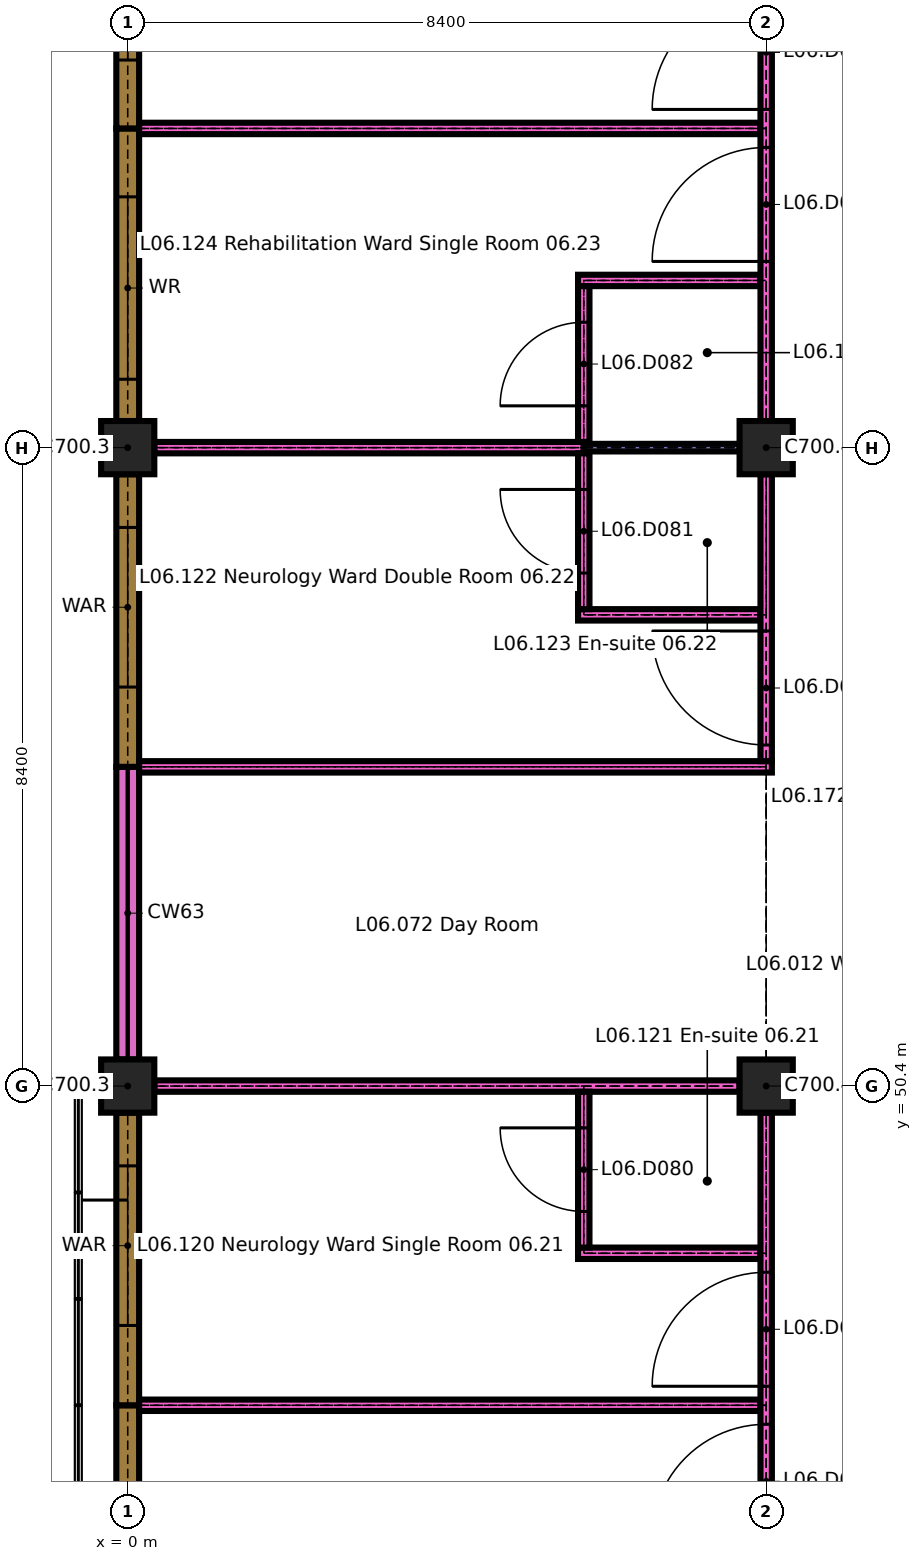
"""IFC4 building model, lengths in metres.
Left out: names, types, materials, properties, quantities, classifications, styles, units other than length and angle.
Written with IfcOpenShell. Run it as: python <this file> out.ifc"""

import sys

from ifc_helpers import new_model, si_unit, direction, frame, frame_2d, origin, origin_2d, place, context, subcontext, project, spatial, rectangle, extrude, element, fill, save


model = new_model("IFC4")
c1 = context("Model", 3, precision=1e-05, world=origin(), true_north=direction((0.0, 1.0)))
c2 = subcontext(c1, "Body", "Model", "MODEL_VIEW")
j1 = project(units=[si_unit("LENGTHUNIT", "METRE"), si_unit("PLANEANGLEUNIT", "RADIAN")], contexts=[c1])
p1 = place(None, origin())
s1 = spatial("IfcSite", under=j1, at=p1, CompositionType="ELEMENT")
p2 = place(p1, origin())
s2 = spatial("IfcBuilding", under=s1, at=p2, CompositionType="ELEMENT")
p3 = place(p2, frame((0.0, 0.0, 26.1)))
s3 = spatial("IfcBuildingStorey", under=s2, at=p3, CompositionType="ELEMENT", Elevation=26.1)
p4 = place(p3, frame((0.0, 50.4, 0.0), z_axis=(0.0, 0.0, 1.0), x_axis=(1.0, 0.0, 0.0)))
e1 = element("IfcColumn", 1, at=p4, inside=s3, PredefinedType="COLUMN", context=c2, shape_type="SweptSolid", body=[
    extrude(rectangle(XDim=0.7, YDim=0.7, at=origin_2d()), origin(), (0.0, 0.0, 1.0), 3.2),
])
p5 = place(p3, frame((8.4, 50.4, 0.0), z_axis=(0.0, 0.0, 1.0), x_axis=(1.0, 0.0, 0.0)))
e2 = element("IfcColumn", 2, at=p5, inside=s3, PredefinedType="COLUMN", context=c2, shape_type="SweptSolid", body=[
    extrude(rectangle(XDim=0.7, YDim=0.7, at=origin_2d()), origin(), (0.0, 0.0, 1.0), 3.3),
])
p6 = place(p3, frame((0.0, 58.8, 0.0), z_axis=(0.0, 0.0, 1.0), x_axis=(1.0, 0.0, 0.0)))
e3 = element("IfcColumn", 3, at=p6, inside=s3, PredefinedType="COLUMN", context=c2, shape_type="SweptSolid", body=[
    extrude(rectangle(XDim=0.7, YDim=0.7, at=origin_2d()), origin(), (0.0, 0.0, 1.0), 3.2),
])
p7 = place(p3, frame((8.4, 58.8, 0.0), z_axis=(0.0, 0.0, 1.0), x_axis=(1.0, 0.0, 0.0)))
e4 = element("IfcColumn", 4, at=p7, inside=s3, PredefinedType="COLUMN", context=c2, shape_type="SweptSolid", body=[
    extrude(rectangle(XDim=0.7, YDim=0.7, at=origin_2d()), origin(), (0.0, 0.0, 1.0), 3.3),
])
p8 = place(p3, frame((0.0, 42.35, 0.0), z_axis=(0.0, 0.0, 1.0), x_axis=(0.0, 1.0, 0.0)))
e5 = element("IfcWall", 5, at=p8, inside=s3, PredefinedType="SOLIDWALL", context=c2, shape_type="SweptSolid", body=[
    extrude(rectangle(XDim=3.85, YDim=0.3, at=frame_2d((1.925, 0.0))), origin(), (0.0, 0.0, 1.0), 2.9),
])
p9 = place(p8, frame((0.7, 0.0, 0.9)))
e6 = element("IfcOpeningElement", 6, at=p9, cuts=e5, PredefinedType="OPENING", context=c2, shape_type="SweptSolid", body=[
    extrude(rectangle(XDim=2.1, YDim=1.5, at=frame_2d((1.05, 0.75))), frame((0.0, 0.16, 0.0), z_axis=(0.0, -1.0, 0.0), x_axis=(1.0, 0.0, 0.0)), (0.0, 0.0, 1.0), 0.32),
])
p10 = place(p3, frame((0.0, 46.2, 0.0), z_axis=(0.0, 0.0, 1.0), x_axis=(0.0, 1.0, 0.0)))
e7 = element("IfcWall", 7, at=p10, inside=s3, PredefinedType="SOLIDWALL", context=c2, shape_type="SweptSolid", body=[
    extrude(rectangle(XDim=3.85, YDim=0.3, at=frame_2d((1.925, 0.0))), origin(), (0.0, 0.0, 1.0), 2.9),
])
p11 = place(p10, frame((1.05, 0.0, 0.9)))
e8 = element("IfcOpeningElement", 8, at=p11, cuts=e7, PredefinedType="OPENING", context=c2, shape_type="SweptSolid", body=[
    extrude(rectangle(XDim=2.1, YDim=1.5, at=frame_2d((1.05, 0.75))), frame((0.0, 0.16, 0.0), z_axis=(0.0, -1.0, 0.0), x_axis=(1.0, 0.0, 0.0)), (0.0, 0.0, 1.0), 0.32),
])
p12 = place(p3, frame((0.0, 50.75, 0.0), z_axis=(0.0, 0.0, 1.0), x_axis=(0.0, 1.0, 0.0)))
e9 = element("IfcWall", 9, at=p12, inside=s3, PredefinedType="SOLIDWALL", context=c2, shape_type="SweptSolid", body=[
    extrude(rectangle(XDim=3.85, YDim=0.3, at=frame_2d((1.925, 0.0))), origin(), (0.0, 0.0, 1.0), 0.6),
])
p13 = place(p3, frame((0.0, 54.6, 0.0), z_axis=(0.0, 0.0, 1.0), x_axis=(0.0, 1.0, 0.0)))
e10 = element("IfcWall", 10, at=p13, inside=s3, PredefinedType="SOLIDWALL", context=c2, shape_type="SweptSolid", body=[
    extrude(rectangle(XDim=3.85, YDim=0.3, at=frame_2d((1.925, 0.0))), origin(), (0.0, 0.0, 1.0), 2.9),
])
p14 = place(p13, frame((1.05, 0.0, 0.9)))
e11 = element("IfcOpeningElement", 11, at=p14, cuts=e10, PredefinedType="OPENING", context=c2, shape_type="SweptSolid", body=[
    extrude(rectangle(XDim=2.1, YDim=1.5, at=frame_2d((1.05, 0.75))), frame((0.0, 0.16, 0.0), z_axis=(0.0, -1.0, 0.0), x_axis=(1.0, 0.0, 0.0)), (0.0, 0.0, 1.0), 0.32),
])
p15 = place(p3, frame((0.0, 59.15, 0.0), z_axis=(0.0, 0.0, 1.0), x_axis=(0.0, 1.0, 0.0)))
e12 = element("IfcWall", 12, at=p15, inside=s3, PredefinedType="SOLIDWALL", context=c2, shape_type="SweptSolid", body=[
    extrude(rectangle(XDim=3.85, YDim=0.3, at=frame_2d((1.925, 0.0))), origin(), (0.0, 0.0, 1.0), 2.9),
])
p16 = place(p15, frame((0.55, 0.0, 0.6)))
e13 = element("IfcOpeningElement", 13, at=p16, cuts=e12, PredefinedType="OPENING", context=c2, shape_type="SweptSolid", body=[
    extrude(rectangle(XDim=2.4, YDim=1.8, at=frame_2d((1.2, 0.9))), frame((0.0, 0.16, 0.0), z_axis=(0.0, -1.0, 0.0), x_axis=(1.0, 0.0, 0.0)), (0.0, 0.0, 1.0), 0.32),
])
p17 = place(p3, frame((0.0, 63.0, 0.0), z_axis=(0.0, 0.0, 1.0), x_axis=(0.0, 1.0, 0.0)))
e14 = element("IfcWall", 14, at=p17, inside=s3, PredefinedType="SOLIDWALL", context=c2, shape_type="SweptSolid", body=[
    extrude(rectangle(XDim=4.2, YDim=0.3, at=frame_2d((2.1, 0.0))), origin(), (0.0, 0.0, 1.0), 2.9),
])
p18 = place(p17, frame((0.9, 0.0, 0.6)))
e15 = element("IfcOpeningElement", 15, at=p18, cuts=e14, PredefinedType="OPENING", context=c2, shape_type="SweptSolid", body=[
    extrude(rectangle(XDim=2.4, YDim=1.8, at=frame_2d((1.2, 0.9))), frame((0.0, 0.16, 0.0), z_axis=(0.0, -1.0, 0.0), x_axis=(1.0, 0.0, 0.0)), (0.0, 0.0, 1.0), 0.32),
])
p19 = place(p3, frame((0.15, 46.2, 0.0), z_axis=(0.0, 0.0, 1.0), x_axis=(1.0, 0.0, 0.0)))
e16 = element("IfcWall", 16, at=p19, inside=s3, PredefinedType="PARTITIONING", context=c2, shape_type="SweptSolid", body=[
    extrude(rectangle(XDim=8.175, YDim=0.15, at=frame_2d((4.087, 0.0))), origin(), (0.0, 0.0, 1.0), 3.3),
])
p20 = place(p3, frame((5.925, 48.2, 0.0), z_axis=(0.0, 0.0, 1.0), x_axis=(1.0, 0.0, 0.0)))
e17 = element("IfcWall", 17, at=p20, inside=s3, PredefinedType="PARTITIONING", context=c2, shape_type="SweptSolid", body=[
    extrude(rectangle(XDim=2.4, YDim=0.15, at=frame_2d((1.2, 0.0))), origin(), (0.0, 0.0, 1.0), 3.3),
])
p21 = place(p3, frame((0.35, 50.4, 0.0), z_axis=(0.0, 0.0, 1.0), x_axis=(1.0, 0.0, 0.0)))
e18 = element("IfcWall", 18, at=p21, inside=s3, PredefinedType="PARTITIONING", context=c2, shape_type="SweptSolid", body=[
    extrude(rectangle(XDim=7.7, YDim=0.15, at=frame_2d((3.85, 0.0))), origin(), (0.0, 0.0, 1.0), 3.3),
])
p22 = place(p3, frame((0.15, 54.6, 0.0), z_axis=(0.0, 0.0, 1.0), x_axis=(1.0, 0.0, 0.0)))
e19 = element("IfcWall", 19, at=p22, inside=s3, PredefinedType="PARTITIONING", context=c2, shape_type="SweptSolid", body=[
    extrude(rectangle(XDim=8.325, YDim=0.15, at=frame_2d((4.163, 0.0))), origin(), (0.0, 0.0, 1.0), 3.3),
])
p23 = place(p3, frame((5.925, 56.6, 0.0), z_axis=(0.0, 0.0, 1.0), x_axis=(1.0, 0.0, 0.0)))
e20 = element("IfcWall", 20, at=p23, inside=s3, PredefinedType="PARTITIONING", context=c2, shape_type="SweptSolid", body=[
    extrude(rectangle(XDim=2.4, YDim=0.15, at=frame_2d((1.2, 0.0))), origin(), (0.0, 0.0, 1.0), 3.3),
])
p24 = place(p3, frame((0.35, 58.8, 0.0), z_axis=(0.0, 0.0, 1.0), x_axis=(1.0, 0.0, 0.0)))
e21 = element("IfcWall", 21, at=p24, inside=s3, PredefinedType="PARTITIONING", context=c2, shape_type="SweptSolid", body=[
    extrude(rectangle(XDim=5.65, YDim=0.15, at=frame_2d((2.825, 0.0))), origin(), (0.0, 0.0, 1.0), 3.3),
])
p25 = place(p3, frame((6.0, 58.8, 0.0), z_axis=(0.0, 0.0, 1.0), x_axis=(1.0, 0.0, 0.0)))
e22 = element("IfcWall", 22, at=p25, inside=s3, PredefinedType="PARTITIONING", context=c2, shape_type="SweptSolid", body=[
    extrude(rectangle(XDim=2.05, YDim=0.1, at=frame_2d((1.025, 0.0))), origin(), (0.0, 0.0, 1.0), 3.3),
])
p26 = place(p3, frame((5.925, 61.0, 0.0), z_axis=(0.0, 0.0, 1.0), x_axis=(1.0, 0.0, 0.0)))
e23 = element("IfcWall", 23, at=p26, inside=s3, PredefinedType="PARTITIONING", context=c2, shape_type="SweptSolid", body=[
    extrude(rectangle(XDim=2.4, YDim=0.15, at=frame_2d((1.2, 0.0))), origin(), (0.0, 0.0, 1.0), 3.3),
])
p27 = place(p3, frame((0.15, 63.0, 0.0), z_axis=(0.0, 0.0, 1.0), x_axis=(1.0, 0.0, 0.0)))
e24 = element("IfcWall", 24, at=p27, inside=s3, PredefinedType="PARTITIONING", context=c2, shape_type="SweptSolid", body=[
    extrude(rectangle(XDim=8.175, YDim=0.15, at=frame_2d((4.087, 0.0))), origin(), (0.0, 0.0, 1.0), 3.3),
])
p28 = place(p3, frame((6.0, 48.275, 0.0), z_axis=(0.0, 0.0, 1.0), x_axis=(0.0, 1.0, 0.0)))
e25 = element("IfcWall", 25, at=p28, inside=s3, PredefinedType="PARTITIONING", context=c2, shape_type="SweptSolid", body=[
    extrude(rectangle(XDim=2.05, YDim=0.15, at=frame_2d((1.025, 0.0))), origin(), (0.0, 0.0, 1.0), 3.3),
])
p29 = place(p28, frame((0.475, 0.0, 0.0)))
e26 = element("IfcOpeningElement", 26, at=p29, cuts=e25, PredefinedType="OPENING", context=c2, shape_type="SweptSolid", body=[
    extrude(rectangle(XDim=1.1, YDim=2.1, at=frame_2d((0.55, 1.05))), frame((0.0, 0.085, 0.0), z_axis=(0.0, -1.0, 0.0), x_axis=(1.0, 0.0, 0.0)), (0.0, 0.0, 1.0), 0.17),
])
p30 = place(p3, frame((6.0, 56.675, 0.0), z_axis=(0.0, 0.0, 1.0), x_axis=(0.0, 1.0, 0.0)))
e27 = element("IfcWall", 27, at=p30, inside=s3, PredefinedType="PARTITIONING", context=c2, shape_type="SweptSolid", body=[
    extrude(rectangle(XDim=2.05, YDim=0.15, at=frame_2d((1.025, 0.0))), origin(), (0.0, 0.0, 1.0), 3.3),
])
p31 = place(p30, frame((0.475, 0.0, 0.0)))
e28 = element("IfcOpeningElement", 28, at=p31, cuts=e27, PredefinedType="OPENING", context=c2, shape_type="SweptSolid", body=[
    extrude(rectangle(XDim=1.1, YDim=2.1, at=frame_2d((0.55, 1.05))), frame((0.0, 0.085, 0.0), z_axis=(0.0, -1.0, 0.0), x_axis=(1.0, 0.0, 0.0)), (0.0, 0.0, 1.0), 0.17),
])
p32 = place(p3, frame((6.0, 58.875, 0.0), z_axis=(0.0, 0.0, 1.0), x_axis=(0.0, 1.0, 0.0)))
e29 = element("IfcWall", 29, at=p32, inside=s3, PredefinedType="PARTITIONING", context=c2, shape_type="SweptSolid", body=[
    extrude(rectangle(XDim=2.05, YDim=0.15, at=frame_2d((1.025, 0.0))), origin(), (0.0, 0.0, 1.0), 3.3),
])
p33 = place(p32, frame((0.475, 0.0, 0.0)))
e30 = element("IfcOpeningElement", 30, at=p33, cuts=e29, PredefinedType="OPENING", context=c2, shape_type="SweptSolid", body=[
    extrude(rectangle(XDim=1.1, YDim=2.1, at=frame_2d((0.55, 1.05))), frame((0.0, 0.085, 0.0), z_axis=(0.0, -1.0, 0.0), x_axis=(1.0, 0.0, 0.0)), (0.0, 0.0, 1.0), 0.17),
])
p34 = place(p3, frame((8.4, 42.35, 0.0), z_axis=(0.0, 0.0, 1.0), x_axis=(0.0, 1.0, 0.0)))
e31 = element("IfcWall", 31, at=p34, inside=s3, PredefinedType="PARTITIONING", context=c2, shape_type="SweptSolid", body=[
    extrude(rectangle(XDim=7.7, YDim=0.15, at=frame_2d((3.85, 0.0))), origin(), (0.0, 0.0, 1.0), 3.3),
])
p35 = place(p34, frame((2.1, 0.0, 0.0)))
e32 = element("IfcOpeningElement", 32, at=p35, cuts=e31, PredefinedType="OPENING", context=c2, shape_type="SweptSolid", body=[
    extrude(rectangle(XDim=1.5, YDim=2.4, at=frame_2d((0.75, 1.2))), frame((0.0, 0.085, 0.0), z_axis=(0.0, -1.0, 0.0), x_axis=(1.0, 0.0, 0.0)), (0.0, 0.0, 1.0), 0.17),
])
p36 = place(p34, frame((4.1, 0.0, 0.0)))
e33 = element("IfcOpeningElement", 33, at=p36, cuts=e31, PredefinedType="OPENING", context=c2, shape_type="SweptSolid", body=[
    extrude(rectangle(XDim=1.5, YDim=2.4, at=frame_2d((0.75, 1.2))), frame((0.0, 0.085, 0.0), z_axis=(0.0, -1.0, 0.0), x_axis=(1.0, 0.0, 0.0)), (0.0, 0.0, 1.0), 0.17),
])
p37 = place(p3, frame((8.4, 54.675, 0.0), z_axis=(0.0, 0.0, 1.0), x_axis=(0.0, 1.0, 0.0)))
e34 = element("IfcWall", 34, at=p37, inside=s3, PredefinedType="PARTITIONING", context=c2, shape_type="SweptSolid", body=[
    extrude(rectangle(XDim=3.775, YDim=0.15, at=frame_2d((1.887, 0.0))), origin(), (0.0, 0.0, 1.0), 3.3),
])
p38 = place(p37, frame((0.212, 0.0, 0.0)))
e35 = element("IfcOpeningElement", 35, at=p38, cuts=e34, PredefinedType="OPENING", context=c2, shape_type="SweptSolid", body=[
    extrude(rectangle(XDim=1.5, YDim=2.4, at=frame_2d((0.75, 1.2))), frame((0.0, 0.085, 0.0), z_axis=(0.0, -1.0, 0.0), x_axis=(1.0, 0.0, 0.0)), (0.0, 0.0, 1.0), 0.17),
])
p39 = place(p3, frame((8.4, 59.15, 0.0), z_axis=(0.0, 0.0, 1.0), x_axis=(0.0, 1.0, 0.0)))
e36 = element("IfcWall", 36, at=p39, inside=s3, PredefinedType="PARTITIONING", context=c2, shape_type="SweptSolid", body=[
    extrude(rectangle(XDim=7.95, YDim=0.15, at=frame_2d((3.975, 0.0))), origin(), (0.0, 0.0, 1.0), 3.3),
])
p40 = place(p39, frame((2.1, 0.0, 0.0)))
e37 = element("IfcOpeningElement", 37, at=p40, cuts=e36, PredefinedType="OPENING", context=c2, shape_type="SweptSolid", body=[
    extrude(rectangle(XDim=1.5, YDim=2.4, at=frame_2d((0.75, 1.2))), frame((0.0, 0.085, 0.0), z_axis=(0.0, -1.0, 0.0), x_axis=(1.0, 0.0, 0.0)), (0.0, 0.0, 1.0), 0.17),
])
p41 = place(p39, frame((4.1, 0.0, 0.0)))
e38 = element("IfcOpeningElement", 38, at=p41, cuts=e36, PredefinedType="OPENING", context=c2, shape_type="SweptSolid", body=[
    extrude(rectangle(XDim=1.5, YDim=2.4, at=frame_2d((0.75, 1.2))), frame((0.0, 0.085, 0.0), z_axis=(0.0, -1.0, 0.0), x_axis=(1.0, 0.0, 0.0)), (0.0, 0.0, 1.0), 0.17),
])
p42 = place(p11, origin())
e39 = element("IfcWindow", 39, at=p42, inside=s3, PartitioningType="DOUBLE_PANEL_VERTICAL", PredefinedType="WINDOW", context=c2, shape_type="SweptSolid", body=[
    extrude(rectangle(XDim=2.1, YDim=1.5, at=frame_2d((1.05, 0.75))), frame((0.0, 0.05, 0.0), z_axis=(0.0, -1.0, 0.0), x_axis=(1.0, 0.0, 0.0)), (0.0, 0.0, 1.0), 0.1),
])
fill(e8, e39)
p43 = place(p14, origin())
e40 = element("IfcWindow", 40, at=p43, inside=s3, PartitioningType="DOUBLE_PANEL_VERTICAL", PredefinedType="WINDOW", context=c2, shape_type="SweptSolid", body=[
    extrude(rectangle(XDim=2.1, YDim=1.5, at=frame_2d((1.05, 0.75))), frame((0.0, 0.05, 0.0), z_axis=(0.0, -1.0, 0.0), x_axis=(1.0, 0.0, 0.0)), (0.0, 0.0, 1.0), 0.1),
])
fill(e11, e40)
p44 = place(p16, origin())
e41 = element("IfcWindow", 41, at=p44, inside=s3, PartitioningType="DOUBLE_PANEL_VERTICAL", PredefinedType="WINDOW", context=c2, shape_type="SweptSolid", body=[
    extrude(rectangle(XDim=2.4, YDim=1.8, at=frame_2d((1.2, 0.9))), frame((0.0, 0.03, 0.0), z_axis=(0.0, -1.0, 0.0), x_axis=(1.0, 0.0, 0.0)), (0.0, 0.0, 1.0), 0.06),
])
fill(e13, e41)
p45 = place(p18, origin())
e42 = element("IfcWindow", 42, at=p45, inside=s3, PartitioningType="DOUBLE_PANEL_VERTICAL", PredefinedType="WINDOW", context=c2, shape_type="SweptSolid", body=[
    extrude(rectangle(XDim=2.4, YDim=1.8, at=frame_2d((1.2, 0.9))), frame((0.0, 0.03, 0.0), z_axis=(0.0, -1.0, 0.0), x_axis=(1.0, 0.0, 0.0)), (0.0, 0.0, 1.0), 0.06),
])
fill(e15, e42)
p46 = place(p29, origin())
e43 = element("IfcDoor", 43, at=p46, inside=s3, OperationType="SINGLE_SWING_LEFT", PredefinedType="DOOR", context=c2, shape_type="SweptSolid", body=[
    extrude(rectangle(XDim=1.1, YDim=2.1, at=frame_2d((0.55, 1.05))), frame((0.0, 0.025, 0.0), z_axis=(0.0, -1.0, 0.0), x_axis=(1.0, 0.0, 0.0)), (0.0, 0.0, 1.0), 0.05),
])
fill(e26, e43)
p47 = place(p31, origin())
e44 = element("IfcDoor", 44, at=p47, inside=s3, OperationType="SINGLE_SWING_LEFT", PredefinedType="DOOR", context=c2, shape_type="SweptSolid", body=[
    extrude(rectangle(XDim=1.1, YDim=2.1, at=frame_2d((0.55, 1.05))), frame((0.0, 0.025, 0.0), z_axis=(0.0, -1.0, 0.0), x_axis=(1.0, 0.0, 0.0)), (0.0, 0.0, 1.0), 0.05),
])
fill(e28, e44)
p48 = place(p33, origin())
e45 = element("IfcDoor", 45, at=p48, inside=s3, OperationType="SINGLE_SWING_RIGHT", PredefinedType="DOOR", context=c2, shape_type="SweptSolid", body=[
    extrude(rectangle(XDim=1.1, YDim=2.1, at=frame_2d((0.55, 1.05))), frame((0.0, 0.025, 0.0), z_axis=(0.0, -1.0, 0.0), x_axis=(1.0, 0.0, 0.0)), (0.0, 0.0, 1.0), 0.05),
])
fill(e30, e45)
p49 = place(p35, origin())
e46 = element("IfcDoor", 46, at=p49, inside=s3, OperationType="SINGLE_SWING_RIGHT", PredefinedType="DOOR", context=c2, shape_type="SweptSolid", body=[
    extrude(rectangle(XDim=1.5, YDim=2.4, at=frame_2d((0.75, 1.2))), frame((0.0, 0.03, 0.0), z_axis=(0.0, -1.0, 0.0), x_axis=(1.0, 0.0, 0.0)), (0.0, 0.0, 1.0), 0.06),
])
fill(e32, e46)
p50 = place(p36, origin())
e47 = element("IfcDoor", 47, at=p50, inside=s3, OperationType="SINGLE_SWING_RIGHT", PredefinedType="DOOR", context=c2, shape_type="SweptSolid", body=[
    extrude(rectangle(XDim=1.5, YDim=2.4, at=frame_2d((0.75, 1.2))), frame((0.0, 0.03, 0.0), z_axis=(0.0, -1.0, 0.0), x_axis=(1.0, 0.0, 0.0)), (0.0, 0.0, 1.0), 0.06),
])
fill(e33, e47)
p51 = place(p38, origin())
e48 = element("IfcDoor", 48, at=p51, inside=s3, OperationType="SINGLE_SWING_LEFT", PredefinedType="DOOR", context=c2, shape_type="SweptSolid", body=[
    extrude(rectangle(XDim=1.5, YDim=2.4, at=frame_2d((0.75, 1.2))), frame((0.0, 0.03, 0.0), z_axis=(0.0, -1.0, 0.0), x_axis=(1.0, 0.0, 0.0)), (0.0, 0.0, 1.0), 0.06),
])
fill(e35, e48)
p52 = place(p40, origin())
e49 = element("IfcDoor", 49, at=p52, inside=s3, OperationType="SINGLE_SWING_RIGHT", PredefinedType="DOOR", context=c2, shape_type="SweptSolid", body=[
    extrude(rectangle(XDim=1.5, YDim=2.4, at=frame_2d((0.75, 1.2))), frame((0.0, 0.03, 0.0), z_axis=(0.0, -1.0, 0.0), x_axis=(1.0, 0.0, 0.0)), (0.0, 0.0, 1.0), 0.06),
])
fill(e37, e49)
p53 = place(p41, origin())
e50 = element("IfcDoor", 50, at=p53, inside=s3, OperationType="SINGLE_SWING_RIGHT", PredefinedType="DOOR", context=c2, shape_type="SweptSolid", body=[
    extrude(rectangle(XDim=1.5, YDim=2.4, at=frame_2d((0.75, 1.2))), frame((0.0, 0.03, 0.0), z_axis=(0.0, -1.0, 0.0), x_axis=(1.0, 0.0, 0.0)), (0.0, 0.0, 1.0), 0.06),
])
fill(e38, e50)
save(model, sys.argv[1])
